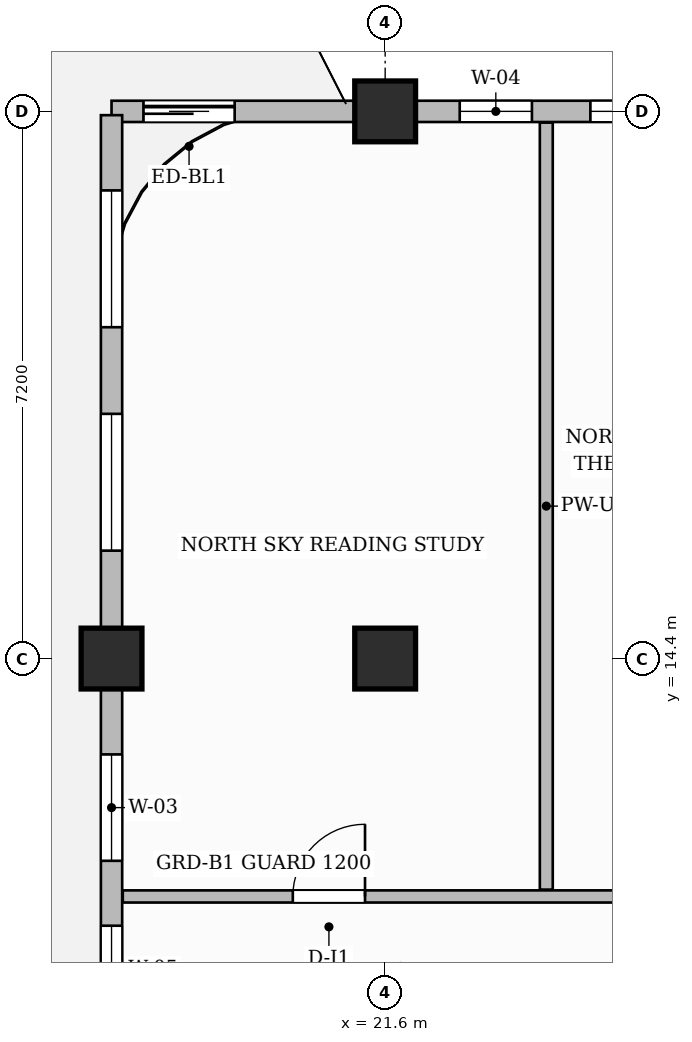
"""IFC4 building model, lengths in metres.
Left out: names, types, materials, properties, quantities, classifications, styles, units other than length and angle.
Written with IfcOpenShell. Run it as: python <this file> out.ifc"""

import sys

from ifc_helpers import new_model, si_unit, direction, frame, frame_2d, origin, origin_2d, place, context, subcontext, project, spatial, rectangle, extrude, source, transform, mapped, element, fill, save


model = new_model("IFC4")
c1 = context("Model", 3, precision=1e-05, world=origin(), true_north=direction((0.0, 1.0)))
c2 = subcontext(c1, "Body", "Model", "MODEL_VIEW")
j1 = project(units=[si_unit("LENGTHUNIT", "METRE"), si_unit("PLANEANGLEUNIT", "RADIAN")], contexts=[c1])
p1 = place(None, origin())
s1 = spatial("IfcSite", under=j1, at=p1, CompositionType="ELEMENT")
p2 = place(p1, origin())
s2 = spatial("IfcBuilding", under=s1, at=p2, CompositionType="ELEMENT")
p3 = place(p2, frame((0.0, 0.0, 267.35)))
s3 = spatial("IfcBuildingStorey", under=s2, at=p3, CompositionType="ELEMENT", Elevation=267.35)
m1 = source(origin(), c2, "Body", "SweptSolid", [
    extrude(rectangle(XDim=0.8, YDim=0.8, at=origin_2d()), origin(), (0.0, 0.0, 1.0), 3.85),
])
for number, where, z_axis, x_axis in (
    (1, (21.6, 14.4, 0.0), (0.0, 0.0, 1.0), (1.0, 0.0, 0.0)),
    (2, (21.6, 21.6, 0.0), (0.0, 0.0, 1.0), (1.0, 0.0, 0.0)),
    (3, (18.0, 14.4, 0.0), (0.0, 0.0, 1.0), (1.0, 0.0, 0.0)),
):
    element("IfcColumn", number, at=place(p3, frame(where, z_axis=z_axis, x_axis=x_axis)), inside=s3, PredefinedType="COLUMN", context=c2, shape_type="MappedRepresentation", body=[
        mapped(m1, transform((0.0, 0.0, 0.0), scale=1.0)),
    ])
p4 = place(p3, frame((18.148, 11.27, 0.0), z_axis=(0.0, 0.0, 1.0), x_axis=(1.0, 0.0, 0.0)))
e4 = element("IfcWall", 4, at=p4, inside=s3, PredefinedType="PARTITIONING", context=c2, shape_type="SweptSolid", body=[
    extrude(rectangle(XDim=11.962, YDim=0.16, at=frame_2d((5.981, 0.0))), origin(), (0.0, 0.0, 1.0), 3.6),
])
p5 = place(p4, frame((2.237, 0.0, 0.0)))
e5 = element("IfcOpeningElement", 5, at=p5, cuts=e4, PredefinedType="OPENING", context=c2, shape_type="SweptSolid", body=[
    extrude(rectangle(XDim=0.95, YDim=2.15, at=frame_2d((0.475, 1.075))), frame((0.0, 0.09, 0.0), z_axis=(0.0, -1.0, 0.0), x_axis=(1.0, 0.0, 0.0)), (0.0, 0.0, 1.0), 0.18),
])
p6 = place(p4, frame((6.577, 0.0, 0.0)))
e6 = element("IfcOpeningElement", 6, at=p6, cuts=e4, PredefinedType="OPENING", context=c2, shape_type="SweptSolid", body=[
    extrude(rectangle(XDim=0.95, YDim=2.15, at=frame_2d((0.475, 1.075))), frame((0.0, 0.09, 0.0), z_axis=(0.0, -1.0, 0.0), x_axis=(1.0, 0.0, 0.0)), (0.0, 0.0, 1.0), 0.18),
])
p7 = place(p4, frame((9.592, 0.0, 0.0)))
e7 = element("IfcOpeningElement", 7, at=p7, cuts=e4, PredefinedType="OPENING", context=c2, shape_type="SweptSolid", body=[
    extrude(rectangle(XDim=1.4, YDim=2.35, at=frame_2d((0.7, 1.175))), frame((0.0, 0.09, 0.0), z_axis=(0.0, -1.0, 0.0), x_axis=(1.0, 0.0, 0.0)), (0.0, 0.0, 1.0), 0.18),
])
p8 = place(p3, frame((23.72, 11.36, 0.0), z_axis=(0.0, 0.0, 1.0), x_axis=(0.0, 1.0, 0.0)))
e8 = element("IfcWall", 8, at=p8, inside=s3, PredefinedType="PARTITIONING", context=c2, shape_type="SweptSolid", body=[
    extrude(rectangle(XDim=10.092, YDim=0.17, at=frame_2d((5.046, 0.0))), origin(), (0.0, 0.0, 1.0), 3.6),
])
p9 = place(p3, frame((18.0, 21.6, 0.0), z_axis=(0.0, 0.0, 1.0), x_axis=(1.0, 0.0, 0.0)))
e9 = element("IfcWall", 9, at=p9, inside=s3, PredefinedType="SOLIDWALL", context=c2, shape_type="SweptSolid", body=[
    extrude(rectangle(XDim=31.8, YDim=0.28, at=frame_2d((15.9, 0.0))), origin(), (0.0, 0.0, 1.0), 3.185),
])
p10 = place(p9, frame((0.42, 0.0, 0.0)))
e10 = element("IfcOpeningElement", 10, at=p10, cuts=e9, PredefinedType="OPENING", context=c2, shape_type="SweptSolid", body=[
    extrude(rectangle(XDim=1.2, YDim=2.2, at=frame_2d((0.6, 1.1))), frame((0.0, 0.15, 0.0), z_axis=(0.0, -1.0, 0.0), x_axis=(1.0, 0.0, 0.0)), (0.0, 0.0, 1.0), 0.3),
])
p11 = place(p9, frame((4.581, 0.0, 0.8)))
e11 = element("IfcOpeningElement", 11, at=p11, cuts=e9, PredefinedType="OPENING", context=c2, shape_type="SweptSolid", body=[
    extrude(rectangle(XDim=0.95, YDim=1.75, at=frame_2d((0.475, 0.875))), frame((0.0, 0.15, 0.0), z_axis=(0.0, -1.0, 0.0), x_axis=(1.0, 0.0, 0.0)), (0.0, 0.0, 1.0), 0.3),
])
p12 = place(p9, frame((6.3, 0.0, 0.8)))
e12 = element("IfcOpeningElement", 12, at=p12, cuts=e9, PredefinedType="OPENING", context=c2, shape_type="SweptSolid", body=[
    extrude(rectangle(XDim=1.8, YDim=1.85, at=frame_2d((0.9, 0.925))), frame((0.0, 0.15, 0.0), z_axis=(0.0, -1.0, 0.0), x_axis=(1.0, 0.0, 0.0)), (0.0, 0.0, 1.0), 0.3),
])
p13 = place(p9, frame((8.869, 0.0, 0.8)))
e13 = element("IfcOpeningElement", 13, at=p13, cuts=e9, PredefinedType="OPENING", context=c2, shape_type="SweptSolid", body=[
    extrude(rectangle(XDim=0.95, YDim=1.75, at=frame_2d((0.475, 0.875))), frame((0.0, 0.15, 0.0), z_axis=(0.0, -1.0, 0.0), x_axis=(1.0, 0.0, 0.0)), (0.0, 0.0, 1.0), 0.3),
])
p14 = place(p9, frame((13.101, 0.0, 0.8)))
e14 = element("IfcOpeningElement", 14, at=p14, cuts=e9, PredefinedType="OPENING", context=c2, shape_type="SweptSolid", body=[
    extrude(rectangle(XDim=1.8, YDim=1.85, at=frame_2d((0.9, 0.925))), frame((0.0, 0.15, 0.0), z_axis=(0.0, -1.0, 0.0), x_axis=(1.0, 0.0, 0.0)), (0.0, 0.0, 1.0), 0.3),
])
p15 = place(p9, frame((18.125, 0.0, 0.8)))
e15 = element("IfcOpeningElement", 15, at=p15, cuts=e9, PredefinedType="OPENING", context=c2, shape_type="SweptSolid", body=[
    extrude(rectangle(XDim=1.8, YDim=1.85, at=frame_2d((0.9, 0.925))), frame((0.0, 0.15, 0.0), z_axis=(0.0, -1.0, 0.0), x_axis=(1.0, 0.0, 0.0)), (0.0, 0.0, 1.0), 0.3),
])
p16 = place(p9, frame((20.875, 0.0, 0.8)))
e16 = element("IfcOpeningElement", 16, at=p16, cuts=e9, PredefinedType="OPENING", context=c2, shape_type="SweptSolid", body=[
    extrude(rectangle(XDim=1.8, YDim=1.85, at=frame_2d((0.9, 0.925))), frame((0.0, 0.15, 0.0), z_axis=(0.0, -1.0, 0.0), x_axis=(1.0, 0.0, 0.0)), (0.0, 0.0, 1.0), 0.3),
])
p17 = place(p9, frame((25.475, 0.0, 0.8)))
e17 = element("IfcOpeningElement", 17, at=p17, cuts=e9, PredefinedType="OPENING", context=c2, shape_type="SweptSolid", body=[
    extrude(rectangle(XDim=1.8, YDim=1.85, at=frame_2d((0.9, 0.925))), frame((0.0, 0.15, 0.0), z_axis=(0.0, -1.0, 0.0), x_axis=(1.0, 0.0, 0.0)), (0.0, 0.0, 1.0), 0.3),
])
p18 = place(p9, frame((28.525, 0.0, 0.8)))
e18 = element("IfcOpeningElement", 18, at=p18, cuts=e9, PredefinedType="OPENING", context=c2, shape_type="SweptSolid", body=[
    extrude(rectangle(XDim=1.8, YDim=1.85, at=frame_2d((0.9, 0.925))), frame((0.0, 0.15, 0.0), z_axis=(0.0, -1.0, 0.0), x_axis=(1.0, 0.0, 0.0)), (0.0, 0.0, 1.0), 0.3),
])
p19 = place(p3, frame((18.0, 0.05, 0.0), z_axis=(0.0, 0.0, 1.0), x_axis=(0.0, 1.0, 0.0)))
e19 = element("IfcWall", 19, at=p19, inside=s3, PredefinedType="SOLIDWALL", context=c2, shape_type="SweptSolid", body=[
    extrude(rectangle(XDim=21.5, YDim=0.28, at=frame_2d((10.75, 0.0))), origin(), (0.0, 0.0, 1.0), 3.6),
])
p20 = place(p19, frame((0.99, 0.0, 0.8)))
e20 = element("IfcOpeningElement", 20, at=p20, cuts=e19, PredefinedType="OPENING", context=c2, shape_type="SweptSolid", body=[
    extrude(rectangle(XDim=1.8, YDim=1.85, at=frame_2d((0.9, 0.925))), frame((0.0, 0.15, 0.0), z_axis=(0.0, -1.0, 0.0), x_axis=(1.0, 0.0, 0.0)), (0.0, 0.0, 1.0), 0.3),
])
p21 = place(p19, frame((3.93, 0.0, 0.8)))
e21 = element("IfcOpeningElement", 21, at=p21, cuts=e19, PredefinedType="OPENING", context=c2, shape_type="SweptSolid", body=[
    extrude(rectangle(XDim=1.8, YDim=1.85, at=frame_2d((0.9, 0.925))), frame((0.0, 0.15, 0.0), z_axis=(0.0, -1.0, 0.0), x_axis=(1.0, 0.0, 0.0)), (0.0, 0.0, 1.0), 0.3),
])
p22 = place(p19, frame((8.146, 0.0, 0.8)))
e22 = element("IfcOpeningElement", 22, at=p22, cuts=e19, PredefinedType="OPENING", context=c2, shape_type="SweptSolid", body=[
    extrude(rectangle(XDim=0.95, YDim=1.75, at=frame_2d((0.475, 0.875))), frame((0.0, 0.15, 0.0), z_axis=(0.0, -1.0, 0.0), x_axis=(1.0, 0.0, 0.0)), (0.0, 0.0, 1.0), 0.3),
])
p23 = place(p19, frame((9.685, 0.0, 0.8)))
e23 = element("IfcOpeningElement", 23, at=p23, cuts=e19, PredefinedType="OPENING", context=c2, shape_type="SweptSolid", body=[
    extrude(rectangle(XDim=1.15, YDim=1.8, at=frame_2d((0.575, 0.9))), frame((0.0, 0.15, 0.0), z_axis=(0.0, -1.0, 0.0), x_axis=(1.0, 0.0, 0.0)), (0.0, 0.0, 1.0), 0.3),
])
p24 = place(p19, frame((11.689, 0.0, 0.8)))
e24 = element("IfcOpeningElement", 24, at=p24, cuts=e19, PredefinedType="OPENING", context=c2, shape_type="SweptSolid", body=[
    extrude(rectangle(XDim=1.4, YDim=1.85, at=frame_2d((0.7, 0.925))), frame((0.0, 0.15, 0.0), z_axis=(0.0, -1.0, 0.0), x_axis=(1.0, 0.0, 0.0)), (0.0, 0.0, 1.0), 0.3),
])
p25 = place(p19, frame((15.77, 0.0, 0.8)))
e25 = element("IfcOpeningElement", 25, at=p25, cuts=e19, PredefinedType="OPENING", context=c2, shape_type="SweptSolid", body=[
    extrude(rectangle(XDim=1.8, YDim=1.85, at=frame_2d((0.9, 0.925))), frame((0.0, 0.15, 0.0), z_axis=(0.0, -1.0, 0.0), x_axis=(1.0, 0.0, 0.0)), (0.0, 0.0, 1.0), 0.3),
])
p26 = place(p19, frame((18.71, 0.0, 0.8)))
e26 = element("IfcOpeningElement", 26, at=p26, cuts=e19, PredefinedType="OPENING", context=c2, shape_type="SweptSolid", body=[
    extrude(rectangle(XDim=1.8, YDim=1.85, at=frame_2d((0.9, 0.925))), frame((0.0, 0.15, 0.0), z_axis=(0.0, -1.0, 0.0), x_axis=(1.0, 0.0, 0.0)), (0.0, 0.0, 1.0), 0.3),
])
m2 = source(origin(), c2, "Body", "SweptSolid", [
    extrude(rectangle(XDim=0.95, YDim=2.15, at=frame_2d((0.475, 1.075))), frame((0.0, 0.025, 0.0), z_axis=(0.0, -1.0, 0.0), x_axis=(1.0, 0.0, 0.0)), (0.0, 0.0, 1.0), 0.05),
])
p27 = place(p5, origin())
e27 = element("IfcDoor", 27, at=p27, inside=s3, OperationType="SINGLE_SWING_RIGHT", PredefinedType="DOOR", context=c2, shape_type="MappedRepresentation", body=[
    mapped(m2, transform((0.0, 0.0, 0.0), scale=1.0)),
])
fill(e5, e27)
m3 = source(origin(), c2, "Body", "SweptSolid", [
    extrude(rectangle(XDim=1.2, YDim=2.2, at=frame_2d((0.6, 1.1))), frame((0.0, 0.025, 0.0), z_axis=(0.0, -1.0, 0.0), x_axis=(1.0, 0.0, 0.0)), (0.0, 0.0, 1.0), 0.05),
])
p28 = place(p10, origin())
e28 = element("IfcDoor", 28, at=p28, inside=s3, OperationType="SLIDING_TO_LEFT", PredefinedType="DOOR", context=c2, shape_type="MappedRepresentation", body=[
    mapped(m3, transform((0.0, 0.0, 0.0), scale=1.0)),
])
fill(e10, e28)
m4 = source(origin(), c2, "Body", "SweptSolid", [
    extrude(rectangle(XDim=0.95, YDim=1.75, at=frame_2d((0.475, 0.875))), frame((0.0, 0.03, 0.0), z_axis=(0.0, -1.0, 0.0), x_axis=(1.0, 0.0, 0.0)), (0.0, 0.0, 1.0), 0.06),
])
p29 = place(p11, origin())
e29 = element("IfcWindow", 29, at=p29, inside=s3, PartitioningType="SINGLE_PANEL", PredefinedType="WINDOW", context=c2, shape_type="MappedRepresentation", body=[
    mapped(m4, transform((0.0, 0.0, 0.0), scale=1.0)),
])
fill(e11, e29)
m5 = source(origin(), c2, "Body", "SweptSolid", [
    extrude(rectangle(XDim=1.8, YDim=1.85, at=frame_2d((0.9, 0.925))), frame((0.0, 0.03, 0.0), z_axis=(0.0, -1.0, 0.0), x_axis=(1.0, 0.0, 0.0)), (0.0, 0.0, 1.0), 0.06),
])
p30 = place(p12, origin())
e30 = element("IfcWindow", 30, at=p30, inside=s3, PartitioningType="DOUBLE_PANEL_VERTICAL", PredefinedType="WINDOW", context=c2, shape_type="MappedRepresentation", body=[
    mapped(m5, transform((0.0, 0.0, 0.0), scale=1.0)),
])
fill(e12, e30)
m6 = source(origin(), c2, "Body", "SweptSolid", [
    extrude(rectangle(XDim=1.15, YDim=1.8, at=frame_2d((0.575, 0.9))), frame((0.0, 0.03, 0.0), z_axis=(0.0, -1.0, 0.0), x_axis=(1.0, 0.0, 0.0)), (0.0, 0.0, 1.0), 0.06),
])
p31 = place(p23, origin())
e31 = element("IfcWindow", 31, at=p31, inside=s3, PartitioningType="SINGLE_PANEL", PredefinedType="WINDOW", context=c2, shape_type="MappedRepresentation", body=[
    mapped(m6, transform((0.0, 0.0, 0.0), scale=1.0)),
])
fill(e23, e31)
m7 = source(origin(), c2, "Body", "SweptSolid", [
    extrude(rectangle(XDim=1.4, YDim=1.85, at=frame_2d((0.7, 0.925))), frame((0.0, 0.03, 0.0), z_axis=(0.0, -1.0, 0.0), x_axis=(1.0, 0.0, 0.0)), (0.0, 0.0, 1.0), 0.06),
])
p32 = place(p24, origin())
e32 = element("IfcWindow", 32, at=p32, inside=s3, PartitioningType="SINGLE_PANEL", PredefinedType="WINDOW", context=c2, shape_type="MappedRepresentation", body=[
    mapped(m7, transform((0.0, 0.0, 0.0), scale=1.0)),
])
fill(e24, e32)
p33 = place(p25, origin())
e33 = element("IfcWindow", 33, at=p33, inside=s3, PartitioningType="DOUBLE_PANEL_VERTICAL", PredefinedType="WINDOW", context=c2, shape_type="MappedRepresentation", body=[
    mapped(m5, transform((0.0, 0.0, 0.0), scale=1.0)),
])
fill(e25, e33)
p34 = place(p26, origin())
e34 = element("IfcWindow", 34, at=p34, inside=s3, PartitioningType="DOUBLE_PANEL_VERTICAL", PredefinedType="WINDOW", context=c2, shape_type="MappedRepresentation", body=[
    mapped(m5, transform((0.0, 0.0, 0.0), scale=1.0)),
])
fill(e26, e34)
save(model, sys.argv[1])
